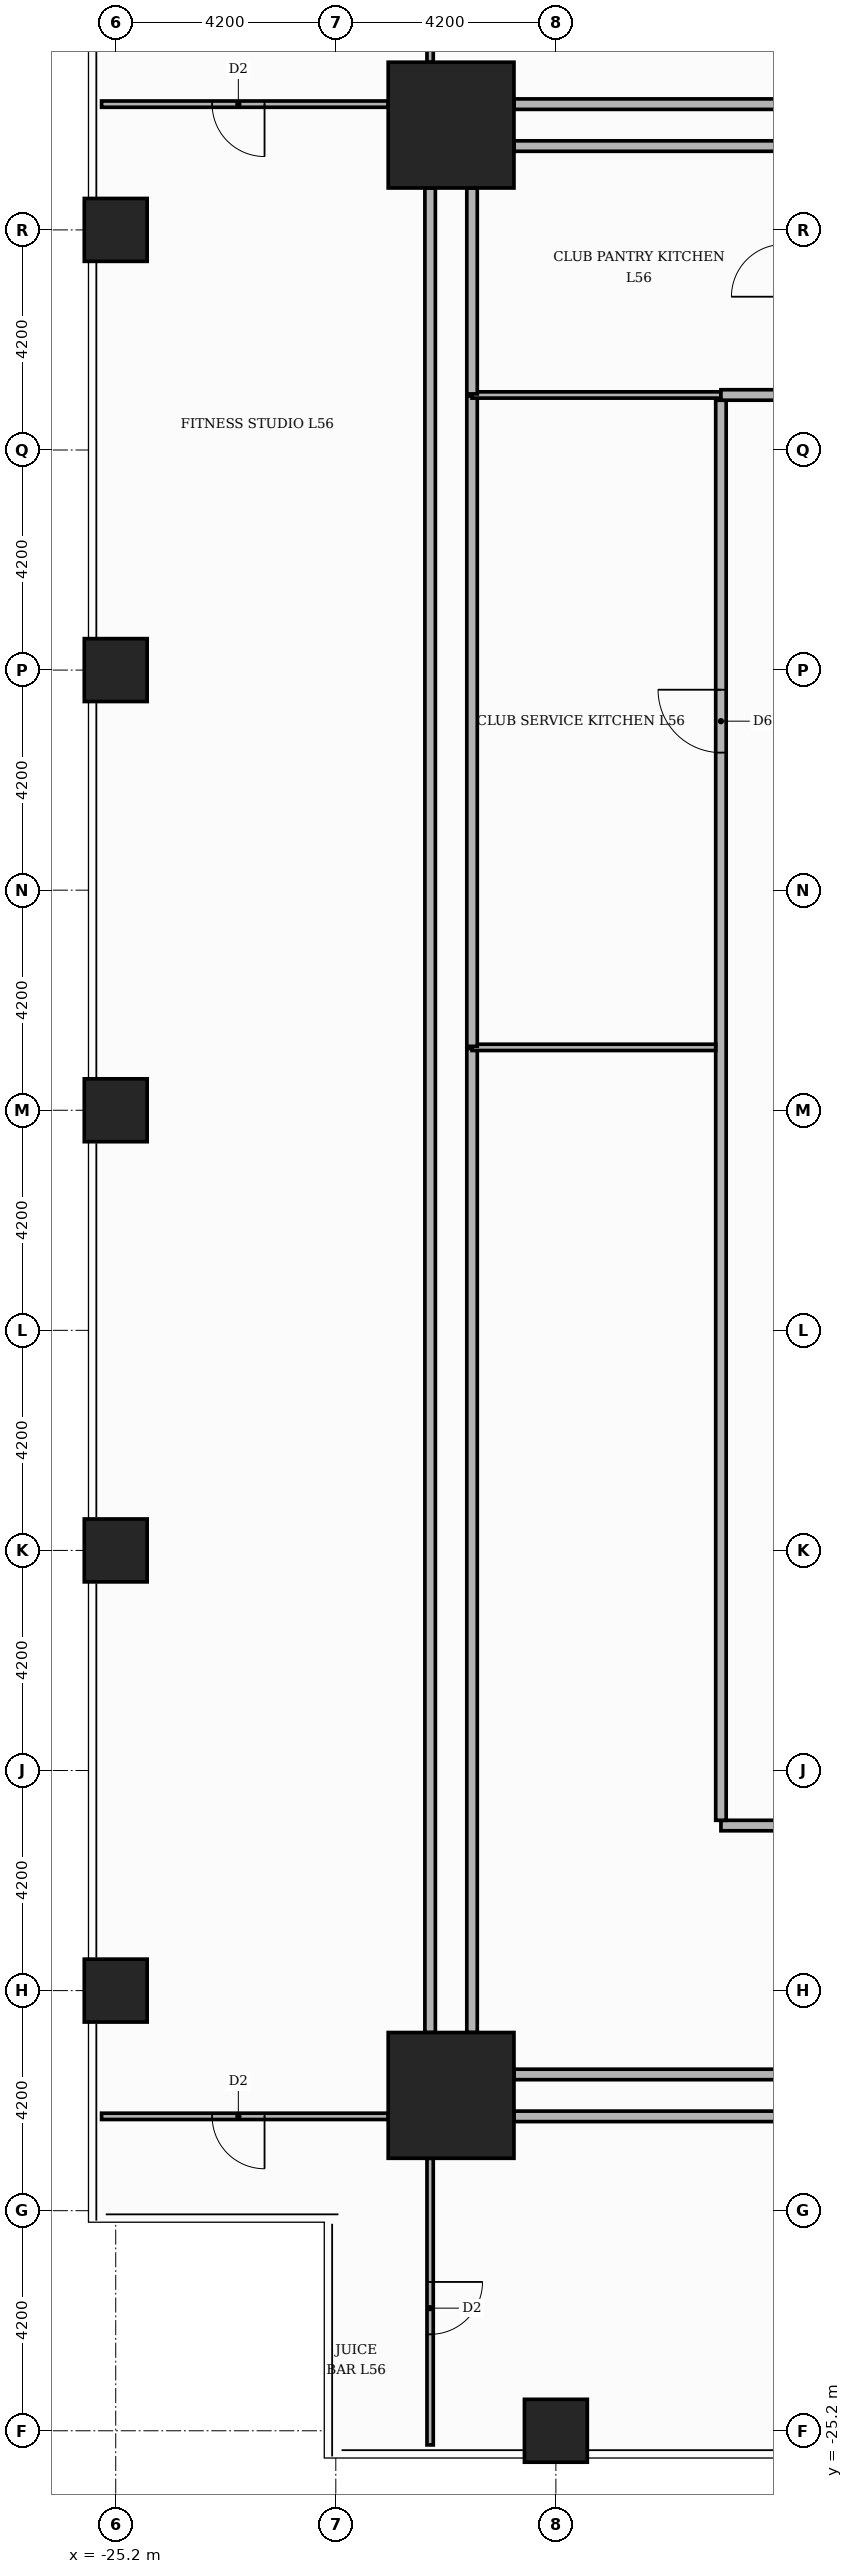
"""IFC4 building model, lengths in metres.
Left out: names, types, materials, properties, quantities, classifications, styles, units other than length and angle.
Written with IfcOpenShell. Run it as: python <this file> out.ifc"""

import sys

from ifc_helpers import new_model, si_unit, direction, frame, frame_2d, origin, origin_2d, place, context, subcontext, project, spatial, rectangle, extrude, element, fill, save


model = new_model("IFC4")
c1 = context("Model", 3, precision=1e-05, world=origin(), true_north=direction((0.0, 1.0)))
c2 = subcontext(c1, "Body", "Model", "MODEL_VIEW")
j1 = project(units=[si_unit("LENGTHUNIT", "METRE"), si_unit("PLANEANGLEUNIT", "RADIAN")], contexts=[c1])
p1 = place(None, origin())
s1 = spatial("IfcSite", under=j1, at=p1, CompositionType="ELEMENT")
p2 = place(p1, origin())
s2 = spatial("IfcBuilding", under=s1, at=p2, CompositionType="ELEMENT")
p3 = place(p2, frame((0.0, 0.0, 235.2)))
s3 = spatial("IfcBuildingStorey", under=s2, at=p3, CompositionType="ELEMENT", Elevation=235.2)
for number, where, z_axis, x_axis in (
    (1, (-18.8, 18.8, 0.0), (0.0, 0.0, 1.0), (1.0, 0.0, 0.0)),
    (2, (-18.8, -18.8, 0.0), (0.0, 0.0, 1.0), (1.0, 0.0, 0.0)),
):
    element("IfcColumn", number, at=place(p3, frame(where, z_axis=z_axis, x_axis=x_axis)), inside=s3, PredefinedType="COLUMN", context=c2, shape_type="SweptSolid", body=[
        extrude(rectangle(XDim=2.4, YDim=2.4, at=origin_2d()), origin(), (0.0, 0.0, 1.0), 5.4),
    ])
for number, where, z_axis, x_axis in (
    (3, (-16.8, -25.2, 0.0), (0.0, 0.0, 1.0), (1.0, 0.0, 0.0)),
    (4, (-25.2, 0.0, 0.0), (0.0, 0.0, 1.0), (1.0, 0.0, 0.0)),
    (5, (-25.2, -8.4, 0.0), (0.0, 0.0, 1.0), (1.0, 0.0, 0.0)),
    (6, (-25.2, -16.8, 0.0), (0.0, 0.0, 1.0), (1.0, 0.0, 0.0)),
    (7, (-25.2, 8.4, 0.0), (0.0, 0.0, 1.0), (1.0, 0.0, 0.0)),
    (8, (-25.2, 16.8, 0.0), (0.0, 0.0, 1.0), (1.0, 0.0, 0.0)),
):
    element("IfcColumn", number, at=place(p3, frame(where, z_axis=z_axis, x_axis=x_axis)), inside=s3, PredefinedType="COLUMN", context=c2, shape_type="SweptSolid", body=[
        extrude(rectangle(XDim=1.2, YDim=1.2, at=origin_2d()), origin(), (0.0, 0.0, 1.0), 5.4),
    ])
p4 = place(p3, frame((-19.2, -25.47, 0.0), z_axis=(0.0, 0.0, 1.0), x_axis=(0.0, 1.0, 0.0)))
e9 = element("IfcWall", 9, at=p4, inside=s3, PredefinedType="PARTITIONING", context=c2, shape_type="SweptSolid", body=[
    extrude(rectangle(XDim=5.47, YDim=0.12, at=frame_2d((2.735, 0.0))), origin(), (0.0, 0.0, 1.0), 4.98),
])
p5 = place(p4, frame((2.11, 0.0, 0.0)))
e10 = element("IfcOpeningElement", 10, at=p5, cuts=e9, PredefinedType="OPENING", context=c2, shape_type="SweptSolid", body=[
    extrude(rectangle(XDim=1.0, YDim=2.1, at=frame_2d((0.5, 1.05))), frame((0.0, 0.07, 0.0), z_axis=(0.0, -1.0, 0.0), x_axis=(1.0, 0.0, 0.0)), (0.0, 0.0, 1.0), 0.14),
])
p6 = place(p3, frame((-25.47, -19.2, 0.0), z_axis=(0.0, 0.0, 1.0), x_axis=(1.0, 0.0, 0.0)))
e11 = element("IfcWall", 11, at=p6, inside=s3, PredefinedType="PARTITIONING", context=c2, shape_type="SweptSolid", body=[
    extrude(rectangle(XDim=5.47, YDim=0.12, at=frame_2d((2.735, 0.0))), origin(), (0.0, 0.0, 1.0), 4.98),
])
p7 = place(p6, frame((2.11, 0.0, 0.0)))
e12 = element("IfcOpeningElement", 12, at=p7, cuts=e11, PredefinedType="OPENING", context=c2, shape_type="SweptSolid", body=[
    extrude(rectangle(XDim=1.0, YDim=2.1, at=frame_2d((0.5, 1.05))), frame((0.0, 0.07, 0.0), z_axis=(0.0, -1.0, 0.0), x_axis=(1.0, 0.0, 0.0)), (0.0, 0.0, 1.0), 0.14),
])
for number, where, z_axis, x_axis in (
    (13, (-17.6, -19.2, 0.0), (0.0, 0.0, 1.0), (1.0, 0.0, 0.0)),
    (14, (-17.6, -18.4, 0.0), (0.0, 0.0, 1.0), (1.0, 0.0, 0.0)),
    (15, (-19.2, -17.6, 0.0), (0.0, 0.0, 1.0), (0.0, 1.0, 0.0)),
):
    element("IfcWall", number, at=place(p3, frame(where, z_axis=z_axis, x_axis=x_axis)), inside=s3, PredefinedType="PARTITIONING", context=c2, shape_type="SweptSolid", body=[
        extrude(rectangle(XDim=35.2, YDim=0.2, at=frame_2d((17.6, 0.0))), origin(), (0.0, 0.0, 1.0), 4.98),
    ])
p8 = place(p3, frame((-18.4, -17.6, 0.0), z_axis=(0.0, 0.0, 1.0), x_axis=(0.0, 1.0, 0.0)))
e16 = element("IfcWall", 16, at=p8, inside=s3, PredefinedType="PARTITIONING", context=c2, shape_type="SweptSolid", body=[
    extrude(rectangle(XDim=18.78, YDim=0.2, at=frame_2d((9.39, 0.0))), origin(), (0.0, 0.0, 1.0), 4.98),
])
p9 = place(p3, frame((-13.65, -13.65, 0.0), z_axis=(0.0, 0.0, 1.0), x_axis=(1.0, 0.0, 0.0)))
e17 = element("IfcWall", 17, at=p9, inside=s3, PredefinedType="PARTITIONING", context=c2, shape_type="SweptSolid", body=[
    extrude(rectangle(XDim=27.3, YDim=0.2, at=frame_2d((13.65, 0.0))), origin(), (0.0, 0.0, 1.0), 4.98),
])
p10 = place(p9, frame((13.05, 0.0, 0.0)))
e18 = element("IfcOpeningElement", 18, at=p10, cuts=e17, PredefinedType="OPENING", context=c2, shape_type="SweptSolid", body=[
    extrude(rectangle(XDim=1.2, YDim=2.1, at=frame_2d((0.6, 1.05))), frame((0.0, 0.11, 0.0), z_axis=(0.0, -1.0, 0.0), x_axis=(1.0, 0.0, 0.0)), (0.0, 0.0, 1.0), 0.22),
])
p11 = place(p3, frame((-13.65, -13.55, 0.0), z_axis=(0.0, 0.0, 1.0), x_axis=(0.0, 1.0, 0.0)))
e19 = element("IfcWall", 19, at=p11, inside=s3, PredefinedType="PARTITIONING", context=c2, shape_type="SweptSolid", body=[
    extrude(rectangle(XDim=27.1, YDim=0.2, at=frame_2d((13.55, 0.0))), origin(), (0.0, 0.0, 1.0), 4.98),
])
p12 = place(p11, frame((20.375, 0.0, 0.0)))
e20 = element("IfcOpeningElement", 20, at=p12, cuts=e19, PredefinedType="OPENING", context=c2, shape_type="SweptSolid", body=[
    extrude(rectangle(XDim=1.2, YDim=2.1, at=frame_2d((0.6, 1.05))), frame((0.0, 0.11, 0.0), z_axis=(0.0, -1.0, 0.0), x_axis=(1.0, 0.0, 0.0)), (0.0, 0.0, 1.0), 0.22),
])
p13 = place(p3, frame((-18.4, 1.2, 0.0), z_axis=(0.0, 0.0, 1.0), x_axis=(1.0, 0.0, 0.0)))
e21 = element("IfcWall", 21, at=p13, inside=s3, PredefinedType="PARTITIONING", context=c2, shape_type="SweptSolid", body=[
    extrude(rectangle(XDim=4.65, YDim=0.12, at=frame_2d((2.325, 0.0))), origin(), (0.0, 0.0, 1.0), 4.98),
])
p14 = place(p3, frame((-18.4, 1.22, 0.0), z_axis=(0.0, 0.0, 1.0), x_axis=(0.0, 1.0, 0.0)))
e22 = element("IfcWall", 22, at=p14, inside=s3, PredefinedType="PARTITIONING", context=c2, shape_type="SweptSolid", body=[
    extrude(rectangle(XDim=12.41, YDim=0.2, at=frame_2d((6.205, 0.0))), origin(), (0.0, 0.0, 1.0), 4.98),
])
p15 = place(p3, frame((-18.4, 13.65, 0.0), z_axis=(0.0, 0.0, 1.0), x_axis=(1.0, 0.0, 0.0)))
e23 = element("IfcWall", 23, at=p15, inside=s3, PredefinedType="PARTITIONING", context=c2, shape_type="SweptSolid", body=[
    extrude(rectangle(XDim=4.75, YDim=0.12, at=frame_2d((2.375, 0.0))), origin(), (0.0, 0.0, 1.0), 4.98),
])
p16 = place(p3, frame((-13.65, 13.65, 0.0), z_axis=(0.0, 0.0, 1.0), x_axis=(1.0, 0.0, 0.0)))
e24 = element("IfcWall", 24, at=p16, inside=s3, PredefinedType="PARTITIONING", context=c2, shape_type="SweptSolid", body=[
    extrude(rectangle(XDim=12.6, YDim=0.2, at=frame_2d((6.3, 0.0))), origin(), (0.0, 0.0, 1.0), 4.98),
])
p17 = place(p3, frame((-18.4, 13.67, 0.0), z_axis=(0.0, 0.0, 1.0), x_axis=(0.0, 1.0, 0.0)))
e25 = element("IfcWall", 25, at=p17, inside=s3, PredefinedType="PARTITIONING", context=c2, shape_type="SweptSolid", body=[
    extrude(rectangle(XDim=3.93, YDim=0.2, at=frame_2d((1.965, 0.0))), origin(), (0.0, 0.0, 1.0), 4.98),
])
p18 = place(p3, frame((-17.6, 18.4, 0.0), z_axis=(0.0, 0.0, 1.0), x_axis=(1.0, 0.0, 0.0)))
e26 = element("IfcWall", 26, at=p18, inside=s3, PredefinedType="PARTITIONING", context=c2, shape_type="SweptSolid", body=[
    extrude(rectangle(XDim=5.13, YDim=0.2, at=frame_2d((2.565, 0.0))), origin(), (0.0, 0.0, 1.0), 4.98),
])
p19 = place(p3, frame((-25.47, 19.2, 0.0), z_axis=(0.0, 0.0, 1.0), x_axis=(1.0, 0.0, 0.0)))
e27 = element("IfcWall", 27, at=p19, inside=s3, PredefinedType="PARTITIONING", context=c2, shape_type="SweptSolid", body=[
    extrude(rectangle(XDim=5.47, YDim=0.12, at=frame_2d((2.735, 0.0))), origin(), (0.0, 0.0, 1.0), 4.98),
])
p20 = place(p19, frame((2.11, 0.0, 0.0)))
e28 = element("IfcOpeningElement", 28, at=p20, cuts=e27, PredefinedType="OPENING", context=c2, shape_type="SweptSolid", body=[
    extrude(rectangle(XDim=1.0, YDim=2.1, at=frame_2d((0.5, 1.05))), frame((0.0, 0.07, 0.0), z_axis=(0.0, -1.0, 0.0), x_axis=(1.0, 0.0, 0.0)), (0.0, 0.0, 1.0), 0.14),
])
p21 = place(p3, frame((-17.6, 19.2, 0.0), z_axis=(0.0, 0.0, 1.0), x_axis=(1.0, 0.0, 0.0)))
e29 = element("IfcWall", 29, at=p21, inside=s3, PredefinedType="PARTITIONING", context=c2, shape_type="SweptSolid", body=[
    extrude(rectangle(XDim=35.2, YDim=0.2, at=frame_2d((17.6, 0.0))), origin(), (0.0, 0.0, 1.0), 4.98),
])
p22 = place(p21, frame((17.0, 0.0, 0.0)))
e30 = element("IfcOpeningElement", 30, at=p22, cuts=e29, PredefinedType="OPENING", context=c2, shape_type="SweptSolid", body=[
    extrude(rectangle(XDim=1.2, YDim=2.1, at=frame_2d((0.6, 1.05))), frame((0.0, 0.11, 0.0), z_axis=(0.0, -1.0, 0.0), x_axis=(1.0, 0.0, 0.0)), (0.0, 0.0, 1.0), 0.22),
])
p23 = place(p3, frame((-19.2, 20.0, 0.0), z_axis=(0.0, 0.0, 1.0), x_axis=(0.0, 1.0, 0.0)))
e31 = element("IfcWall", 31, at=p23, inside=s3, PredefinedType="PARTITIONING", context=c2, shape_type="SweptSolid", body=[
    extrude(rectangle(XDim=5.47, YDim=0.12, at=frame_2d((2.735, 0.0))), origin(), (0.0, 0.0, 1.0), 4.98),
])
p24 = place(p23, frame((2.36, 0.0, 0.0)))
e32 = element("IfcOpeningElement", 32, at=p24, cuts=e31, PredefinedType="OPENING", context=c2, shape_type="SweptSolid", body=[
    extrude(rectangle(XDim=1.0, YDim=2.1, at=frame_2d((0.5, 1.05))), frame((0.0, 0.07, 0.0), z_axis=(0.0, -1.0, 0.0), x_axis=(1.0, 0.0, 0.0)), (0.0, 0.0, 1.0), 0.14),
])
p25 = place(p12, origin())
e33 = element("IfcDoor", 33, at=p25, inside=s3, OperationType="SINGLE_SWING_RIGHT", PredefinedType="DOOR", context=c2, shape_type="SweptSolid", body=[
    extrude(rectangle(XDim=1.2, YDim=2.1, at=frame_2d((0.6, 1.05))), frame((0.0, 0.025, 0.0), z_axis=(0.0, -1.0, 0.0), x_axis=(1.0, 0.0, 0.0)), (0.0, 0.0, 1.0), 0.05),
])
fill(e20, e33)
p26 = place(p20, frame((1.0, 0.0, 0.0), z_axis=(0.0, 0.0, 1.0), x_axis=(-1.0, 0.0, 0.0)))
e34 = element("IfcDoor", 34, at=p26, inside=s3, OperationType="SINGLE_SWING_RIGHT", PredefinedType="DOOR", context=c2, shape_type="SweptSolid", body=[
    extrude(rectangle(XDim=1.0, YDim=2.1, at=frame_2d((0.5, 1.05))), frame((0.0, 0.025, 0.0), z_axis=(0.0, -1.0, 0.0), x_axis=(1.0, 0.0, 0.0)), (0.0, 0.0, 1.0), 0.05),
])
fill(e28, e34)
p27 = place(p7, frame((1.0, 0.0, 0.0), z_axis=(0.0, 0.0, 1.0), x_axis=(-1.0, 0.0, 0.0)))
e35 = element("IfcDoor", 35, at=p27, inside=s3, OperationType="SINGLE_SWING_RIGHT", PredefinedType="DOOR", context=c2, shape_type="SweptSolid", body=[
    extrude(rectangle(XDim=1.0, YDim=2.1, at=frame_2d((0.5, 1.05))), frame((0.0, 0.025, 0.0), z_axis=(0.0, -1.0, 0.0), x_axis=(1.0, 0.0, 0.0)), (0.0, 0.0, 1.0), 0.05),
])
fill(e12, e35)
p28 = place(p5, frame((1.0, 0.0, 0.0), z_axis=(0.0, 0.0, 1.0), x_axis=(-1.0, 0.0, 0.0)))
e36 = element("IfcDoor", 36, at=p28, inside=s3, OperationType="SINGLE_SWING_RIGHT", PredefinedType="DOOR", context=c2, shape_type="SweptSolid", body=[
    extrude(rectangle(XDim=1.0, YDim=2.1, at=frame_2d((0.5, 1.05))), frame((0.0, 0.025, 0.0), z_axis=(0.0, -1.0, 0.0), x_axis=(1.0, 0.0, 0.0)), (0.0, 0.0, 1.0), 0.05),
])
fill(e10, e36)
save(model, sys.argv[1])
